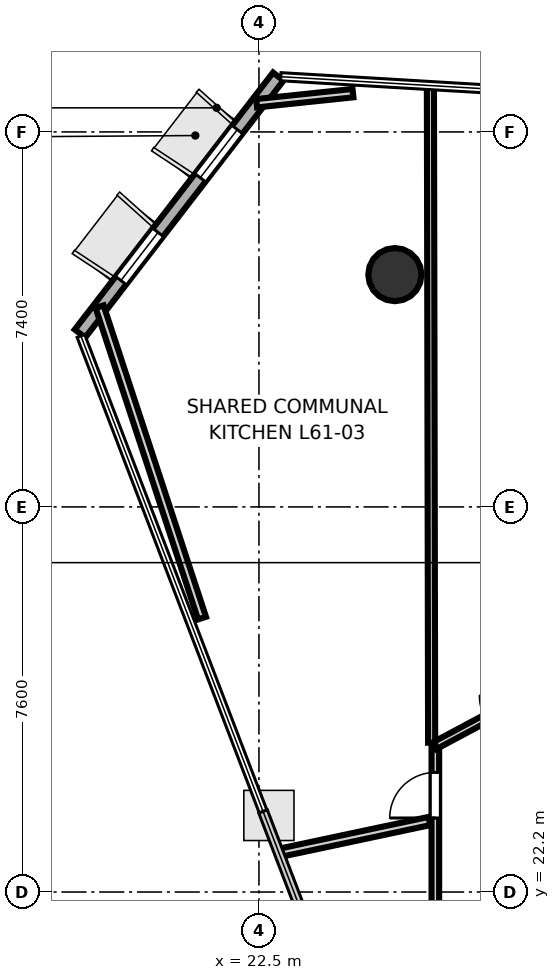
"""IFC4 building model, lengths in metres.
Left out: names, types, materials, properties, quantities, classifications, styles, units other than length and angle.
Written with IfcOpenShell. Run it as: python <this file> out.ifc"""

import sys

from ifc_helpers import new_model, si_unit, direction, frame, frame_2d, origin, origin_2d, place, context, subcontext, project, spatial, rectangle, hollow_circle, extrude, element, fill, save


model = new_model("IFC4")
c1 = context("Model", 3, precision=1e-05, world=origin(), true_north=direction((0.0, 1.0)))
c2 = subcontext(c1, "Body", "Model", "MODEL_VIEW")
j1 = project(units=[si_unit("LENGTHUNIT", "METRE"), si_unit("PLANEANGLEUNIT", "RADIAN")], contexts=[c1])
p1 = place(None, origin())
s1 = spatial("IfcSite", under=j1, at=p1, CompositionType="ELEMENT")
p2 = place(p1, origin())
s2 = spatial("IfcBuilding", under=s1, at=p2, CompositionType="ELEMENT")
p3 = place(p2, frame((0.0, 0.0, 239.0)))
s3 = spatial("IfcBuildingStorey", under=s2, at=p3, CompositionType="ELEMENT", Elevation=239.0)
p4 = place(p3, frame((25.182, 34.384, 0.0), z_axis=(0.0, 0.0, 1.0), x_axis=(1.0, 0.0, 0.0)))
e1 = element("IfcColumn", 1, at=p4, inside=s3, PredefinedType="COLUMN", context=c2, shape_type="SweptSolid", body=[
    extrude(hollow_circle(Radius=0.525, WallThickness=0.028, at=origin_2d()), origin(), (0.0, 0.0, 1.0), 3.7),
])
p5 = place(p3, frame((22.882, 38.293, 0.0), z_axis=(0.0, 0.0, 1.0), x_axis=(-0.610907208769, -0.791702205551, 0.0)))
e2 = element("IfcWall", 2, at=p5, inside=s3, PredefinedType="SOLIDWALL", context=c2, shape_type="SweptSolid", body=[
    extrude(rectangle(XDim=6.406, YDim=0.26, at=frame_2d((3.203, 0.0))), origin(), (0.0, 0.0, 1.0), 3.52),
])
p6 = place(p5, frame((1.322, 0.0, 0.9)))
e3 = element("IfcOpeningElement", 3, at=p6, cuts=e2, PredefinedType="OPENING", context=c2, shape_type="SweptSolid", body=[
    extrude(rectangle(XDim=1.2, YDim=2.0, at=frame_2d((0.6, 1.0))), frame((0.0, 0.14, 0.0), z_axis=(0.0, -1.0, 0.0), x_axis=(1.0, 0.0, 0.0)), (0.0, 0.0, 1.0), 0.28),
])
p7 = place(p5, frame((3.885, 0.0, 0.9)))
e4 = element("IfcOpeningElement", 4, at=p7, cuts=e2, PredefinedType="OPENING", context=c2, shape_type="SweptSolid", body=[
    extrude(rectangle(XDim=1.2, YDim=2.0, at=frame_2d((0.6, 1.0))), frame((0.0, 0.14, 0.0), z_axis=(0.0, -1.0, 0.0), x_axis=(1.0, 0.0, 0.0)), (0.0, 0.0, 1.0), 0.28),
])
p8 = place(p3, frame((25.981, 21.289, 0.0), z_axis=(0.0, 0.0, 1.0), x_axis=(0.0, 1.0, 0.0)))
e5 = element("IfcWall", 5, at=p8, inside=s3, PredefinedType="PARTITIONING", context=c2, shape_type="SweptSolid", body=[
    extrude(rectangle(XDim=3.824, YDim=0.15, at=frame_2d((1.912, 0.0))), origin(), (0.0, 0.0, 1.0), 2.84),
])
p9 = place(p8, frame((2.371, 0.0, 0.0)))
e6 = element("IfcOpeningElement", 6, at=p9, cuts=e5, PredefinedType="OPENING", context=c2, shape_type="SweptSolid", body=[
    extrude(rectangle(XDim=0.9, YDim=2.1, at=frame_2d((0.45, 1.05))), frame((0.0, 0.085, 0.0), z_axis=(0.0, -1.0, 0.0), x_axis=(1.0, 0.0, 0.0)), (0.0, 0.0, 1.0), 0.17),
])
p10 = place(p3, frame((25.965, 25.086, 0.0), z_axis=(0.0, 0.0, 1.0), x_axis=(0.881881208279, 0.471471668803, 0.0)))
e7 = element("IfcWall", 7, at=p10, inside=s3, PredefinedType="PARTITIONING", context=c2, shape_type="SweptSolid", body=[
    extrude(rectangle(XDim=1.491, YDim=0.15, at=frame_2d((0.746, 0.0))), origin(), (0.0, 0.0, 1.0), 2.84),
])
p11 = place(p3, frame((25.908, 25.146, 0.0), z_axis=(0.0, 0.0, 1.0), x_axis=(-0.001860864055, 0.999998268591, 0.0)))
e8 = element("IfcWall", 8, at=p11, inside=s3, PredefinedType="PARTITIONING", context=c2, shape_type="SweptSolid", body=[
    extrude(rectangle(XDim=12.989, YDim=0.14, at=frame_2d((6.494, 0.0))), origin(), (0.0, 0.0, 1.0), 2.84),
])
p12 = place(p3, frame((25.864, 23.601, 0.0), z_axis=(0.0, 0.0, 1.0), x_axis=(-0.978142599983, -0.207935216108, 0.0)))
e9 = element("IfcWall", 9, at=p12, inside=s3, PredefinedType="PLUMBINGWALL", context=c2, shape_type="SweptSolid", body=[
    extrude(rectangle(XDim=3.055, YDim=0.165, at=frame_2d((1.528, 0.0))), origin(), (0.0, 0.0, 1.0), 2.84),
])
p13 = place(p3, frame((21.376, 27.606, 0.0), z_axis=(0.0, 0.0, 1.0), x_axis=(-0.312432120662, 0.949940087573, 0.0)))
e10 = element("IfcWall", 10, at=p13, inside=s3, PredefinedType="PLUMBINGWALL", context=c2, shape_type="SweptSolid", body=[
    extrude(rectangle(XDim=6.469, YDim=0.165, at=frame_2d((3.234, 0.0))), origin(), (0.0, 0.0, 1.0), 2.84),
])
p14 = place(p3, frame((22.454, 37.766, 0.0), z_axis=(0.0, 0.0, 1.0), x_axis=(0.994566178833, 0.104106272251, 0.0)))
e11 = element("IfcWall", 11, at=p14, inside=s3, PredefinedType="PLUMBINGWALL", context=c2, shape_type="SweptSolid", body=[
    extrude(rectangle(XDim=1.911, YDim=0.165, at=frame_2d((0.956, 0.0))), origin(), (0.0, 0.0, 1.0), 2.84),
])
p15 = place(p9, origin())
e12 = element("IfcDoor", 12, at=p15, inside=s3, OperationType="SINGLE_SWING_LEFT", PredefinedType="DOOR", context=c2, shape_type="SweptSolid", body=[
    extrude(rectangle(XDim=0.9, YDim=2.1, at=frame_2d((0.45, 1.05))), frame((0.0, 0.025, 0.0), z_axis=(0.0, -1.0, 0.0), x_axis=(1.0, 0.0, 0.0)), (0.0, 0.0, 1.0), 0.05),
])
fill(e6, e12)
p16 = place(p6, origin())
e13 = element("IfcWindow", 13, at=p16, inside=s3, PartitioningType="SINGLE_PANEL", PredefinedType="WINDOW", context=c2, shape_type="SweptSolid", body=[
    extrude(rectangle(XDim=1.2, YDim=2.0, at=frame_2d((0.6, 1.0))), frame((0.0, 0.03, 0.0), z_axis=(0.0, -1.0, 0.0), x_axis=(1.0, 0.0, 0.0)), (0.0, 0.0, 1.0), 0.06),
])
fill(e3, e13)
p17 = place(p7, origin())
e14 = element("IfcWindow", 14, at=p17, inside=s3, PartitioningType="SINGLE_PANEL", PredefinedType="WINDOW", context=c2, shape_type="SweptSolid", body=[
    extrude(rectangle(XDim=1.2, YDim=2.0, at=frame_2d((0.6, 1.0))), frame((0.0, 0.03, 0.0), z_axis=(0.0, -1.0, 0.0), x_axis=(1.0, 0.0, 0.0)), (0.0, 0.0, 1.0), 0.06),
])
fill(e4, e14)
save(model, sys.argv[1])
